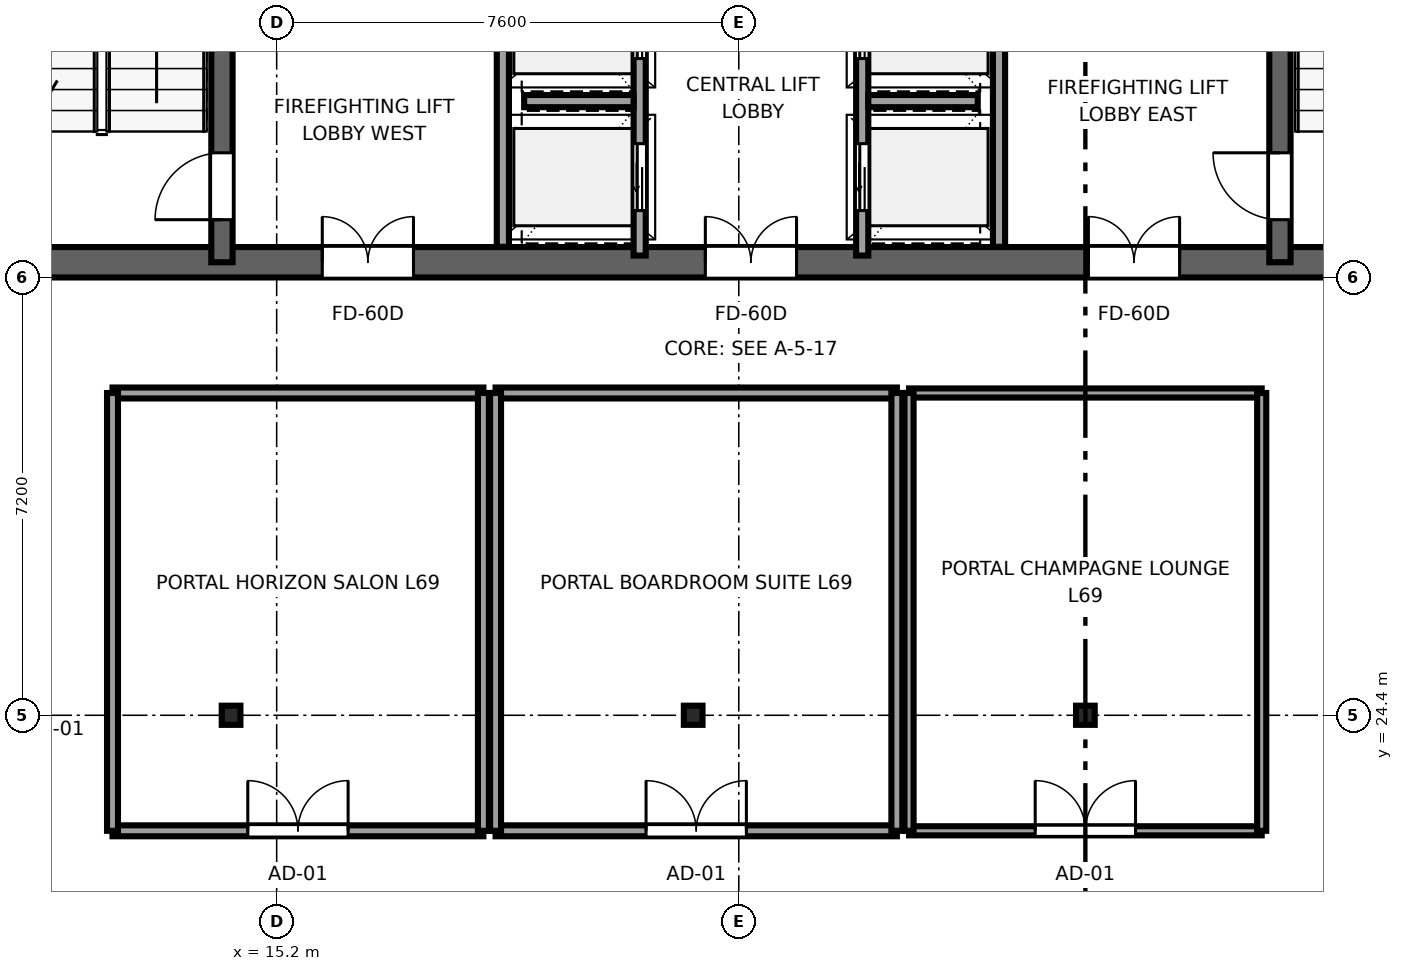
"""IFC4 building model, lengths in metres.
Left out: names, types, materials, properties, quantities, classifications, styles, units other than length and angle.
Written with IfcOpenShell. Run it as: python <this file> out.ifc"""

import sys

from ifc_helpers import new_model, si_unit, direction, frame, frame_2d, origin, origin_2d, place, context, subcontext, project, spatial, rectangle, i_section, extrude, source, transform, mapped, element, fill, save


model = new_model("IFC4")
c1 = context("Model", 3, precision=1e-05, world=origin(), true_north=direction((0.0, 1.0)))
c2 = subcontext(c1, "Body", "Model", "MODEL_VIEW")
j1 = project(units=[si_unit("LENGTHUNIT", "METRE"), si_unit("PLANEANGLEUNIT", "RADIAN")], contexts=[c1])
p1 = place(None, origin())
s1 = spatial("IfcSite", under=j1, at=p1, CompositionType="ELEMENT")
p2 = place(p1, origin())
s2 = spatial("IfcBuilding", under=s1, at=p2, CompositionType="ELEMENT")
p3 = place(p2, frame((0.0, 0.0, 259.4)))
s3 = spatial("IfcBuildingStorey", under=s2, at=p3, CompositionType="ELEMENT", Elevation=259.4)
p4 = place(p3, frame((10.0, 31.85, 0.0), z_axis=(0.0, 0.0, 1.0), x_axis=(1.0, 0.0, 0.0)))
e1 = element("IfcWall", 1, at=p4, inside=s3, PredefinedType="SHEAR", context=c2, shape_type="SweptSolid", body=[
    extrude(rectangle(XDim=26.0, YDim=0.5, at=frame_2d((13.0, 0.0))), origin(), (0.0, 0.0, 1.0), 3.55),
])
p5 = place(p4, frame((7.45, 0.0, 0.0), z_axis=(0.0, 0.0, 1.0), x_axis=(-1.0, 0.0, 0.0)))
e2 = element("IfcOpeningElement", 2, at=p5, cuts=e1, PredefinedType="OPENING", context=c2, shape_type="SweptSolid", body=[
    extrude(rectangle(XDim=1.5, YDim=2.04, at=frame_2d((0.75, 1.02))), frame((0.0, 0.26, 0.0), z_axis=(0.0, -1.0, 0.0), x_axis=(1.0, 0.0, 0.0)), (0.0, 0.0, 1.0), 0.52),
])
p6 = place(p4, frame((13.75, 0.0, 0.0), z_axis=(0.0, 0.0, 1.0), x_axis=(-1.0, 0.0, 0.0)))
e3 = element("IfcOpeningElement", 3, at=p6, cuts=e1, PredefinedType="OPENING", context=c2, shape_type="SweptSolid", body=[
    extrude(rectangle(XDim=1.5, YDim=2.04, at=frame_2d((0.75, 1.02))), frame((0.0, 0.26, 0.0), z_axis=(0.0, -1.0, 0.0), x_axis=(1.0, 0.0, 0.0)), (0.0, 0.0, 1.0), 0.52),
])
p7 = place(p4, frame((20.05, 0.0, 0.0), z_axis=(0.0, 0.0, 1.0), x_axis=(-1.0, 0.0, 0.0)))
e4 = element("IfcOpeningElement", 4, at=p7, cuts=e1, PredefinedType="OPENING", context=c2, shape_type="SweptSolid", body=[
    extrude(rectangle(XDim=1.5, YDim=2.04, at=frame_2d((0.75, 1.02))), frame((0.0, 0.26, 0.0), z_axis=(0.0, -1.0, 0.0), x_axis=(1.0, 0.0, 0.0)), (0.0, 0.0, 1.0), 0.52),
])
p8 = place(p3, frame((14.3, 31.85, 0.0), z_axis=(0.0, 0.0, 1.0), x_axis=(0.0, 1.0, 0.0)))
e5 = element("IfcWall", 5, at=p8, inside=s3, PredefinedType="SHEAR", context=c2, shape_type="SweptSolid", body=[
    extrude(rectangle(XDim=13.1, YDim=0.35, at=frame_2d((6.55, 0.0))), origin(), (0.0, 0.0, 1.0), 3.55),
])
p9 = place(p8, frame((0.7, 0.0, 0.0)))
e6 = element("IfcOpeningElement", 6, at=p9, cuts=e5, PredefinedType="OPENING", context=c2, shape_type="SweptSolid", body=[
    extrude(rectangle(XDim=1.1, YDim=2.12, at=frame_2d((0.55, 1.06))), frame((0.0, 0.185, 0.0), z_axis=(0.0, -1.0, 0.0), x_axis=(1.0, 0.0, 0.0)), (0.0, 0.0, 1.0), 0.37),
])
p10 = place(p3, frame((31.7, 31.85, 0.0), z_axis=(0.0, 0.0, 1.0), x_axis=(0.0, 1.0, 0.0)))
e7 = element("IfcWall", 7, at=p10, inside=s3, PredefinedType="SHEAR", context=c2, shape_type="SweptSolid", body=[
    extrude(rectangle(XDim=13.1, YDim=0.35, at=frame_2d((6.55, 0.0))), origin(), (0.0, 0.0, 1.0), 3.55),
])
p11 = place(p10, frame((1.8, 0.0, 0.0), z_axis=(0.0, 0.0, 1.0), x_axis=(-1.0, 0.0, 0.0)))
e8 = element("IfcOpeningElement", 8, at=p11, cuts=e7, PredefinedType="OPENING", context=c2, shape_type="SweptSolid", body=[
    extrude(rectangle(XDim=1.1, YDim=2.12, at=frame_2d((0.55, 1.06))), frame((0.0, 0.185, 0.0), z_axis=(0.0, -1.0, 0.0), x_axis=(1.0, 0.0, 0.0)), (0.0, 0.0, 1.0), 0.37),
])
m1 = source(origin(), c2, "Body", "SweptSolid", [
    extrude(i_section(OverallWidth=0.307, OverallDepth=0.315, WebThickness=0.012, FlangeThickness=0.019, FilletRadius=0.017, at=origin_2d()), origin(), (0.0, 0.0, 1.0), 3.55),
])
for number, where, z_axis, x_axis in (
    (9, (14.45, 24.4, 0.0), (0.0, 0.0, 1.0), (1.0, 0.0, 0.0)),
    (10, (22.05, 24.4, 0.0), (0.0, 0.0, 1.0), (1.0, 0.0, 0.0)),
    (11, (28.5, 24.4, 0.0), (0.0, 0.0, 1.0), (1.0, 0.0, 0.0)),
):
    element("IfcColumn", number, at=place(p3, frame(where, z_axis=z_axis, x_axis=x_axis)), inside=s3, PredefinedType="COLUMN", context=c2, shape_type="MappedRepresentation", body=[
        mapped(m1, transform((0.0, 0.0, 0.0), x_axis=(1.0, 0.0, 0.0), y_axis=(0.0, 1.0, 0.0), z_axis=(0.0, 0.0, 1.0), scale=1.0)),
    ])
for number, where, z_axis, x_axis in (
    (12, (18.92, 32.104, 0.0), (0.0, 0.0, 1.0), (0.0, 1.0, 0.0)),
    (13, (27.08, 32.104, 0.0), (0.0, 0.0, 1.0), (0.0, 1.0, 0.0)),
):
    element("IfcWall", number, at=place(p3, frame(where, z_axis=z_axis, x_axis=x_axis)), inside=s3, PredefinedType="SOLIDWALL", context=c2, shape_type="SweptSolid", body=[
        extrude(rectangle(XDim=4.046, YDim=0.2, at=frame_2d((2.023, 0.0))), origin(), (0.0, 0.0, 1.0), 3.37),
    ])
p12 = place(p3, frame((21.17, 31.96, 0.0), z_axis=(0.0, 0.0, 1.0), x_axis=(0.0, 1.0, 0.0)))
e14 = element("IfcWall", 14, at=p12, inside=s3, PredefinedType="SOLIDWALL", context=c2, shape_type="SweptSolid", body=[
    extrude(rectangle(XDim=5.08, YDim=0.2, at=frame_2d((2.54, 0.0))), origin(), (0.0, 0.0, 1.0), 3.37),
])
p13 = place(p12, frame((0.74, 0.0, 0.0)))
e15 = element("IfcOpeningElement", 15, at=p13, cuts=e14, PredefinedType="OPENING", context=c2, shape_type="SweptSolid", body=[
    extrude(rectangle(XDim=1.1, YDim=2.12, at=frame_2d((0.55, 1.06))), frame((0.0, 0.11, 0.0), z_axis=(0.0, -1.0, 0.0), x_axis=(1.0, 0.0, 0.0)), (0.0, 0.0, 1.0), 0.22),
])
p14 = place(p12, frame((3.24, 0.0, 0.0)))
e16 = element("IfcOpeningElement", 16, at=p14, cuts=e14, PredefinedType="OPENING", context=c2, shape_type="SweptSolid", body=[
    extrude(rectangle(XDim=1.1, YDim=2.12, at=frame_2d((0.55, 1.06))), frame((0.0, 0.11, 0.0), z_axis=(0.0, -1.0, 0.0), x_axis=(1.0, 0.0, 0.0)), (0.0, 0.0, 1.0), 0.22),
])
p15 = place(p3, frame((19.27, 34.5, 0.0), z_axis=(0.0, 0.0, 1.0), x_axis=(1.0, 0.0, 0.0)))
e17 = element("IfcWall", 17, at=p15, inside=s3, PredefinedType="SOLIDWALL", context=c2, shape_type="SweptSolid", body=[
    extrude(rectangle(XDim=1.8, YDim=0.2, at=frame_2d((0.9, 0.0))), origin(), (0.0, 0.0, 1.0), 3.37),
])
p16 = place(p3, frame((24.83, 31.96, 0.0), z_axis=(0.0, 0.0, 1.0), x_axis=(0.0, 1.0, 0.0)))
e18 = element("IfcWall", 18, at=p16, inside=s3, PredefinedType="SOLIDWALL", context=c2, shape_type="SweptSolid", body=[
    extrude(rectangle(XDim=5.08, YDim=0.2, at=frame_2d((2.54, 0.0))), origin(), (0.0, 0.0, 1.0), 3.37),
])
p17 = place(p16, frame((0.74, 0.0, 0.0)))
e19 = element("IfcOpeningElement", 19, at=p17, cuts=e18, PredefinedType="OPENING", context=c2, shape_type="SweptSolid", body=[
    extrude(rectangle(XDim=1.1, YDim=2.12, at=frame_2d((0.55, 1.06))), frame((0.0, 0.11, 0.0), z_axis=(0.0, -1.0, 0.0), x_axis=(1.0, 0.0, 0.0)), (0.0, 0.0, 1.0), 0.22),
])
p18 = place(p16, frame((3.24, 0.0, 0.0)))
e20 = element("IfcOpeningElement", 20, at=p18, cuts=e18, PredefinedType="OPENING", context=c2, shape_type="SweptSolid", body=[
    extrude(rectangle(XDim=1.1, YDim=2.12, at=frame_2d((0.55, 1.06))), frame((0.0, 0.11, 0.0), z_axis=(0.0, -1.0, 0.0), x_axis=(1.0, 0.0, 0.0)), (0.0, 0.0, 1.0), 0.22),
])
p19 = place(p3, frame((24.93, 34.5, 0.0), z_axis=(0.0, 0.0, 1.0), x_axis=(1.0, 0.0, 0.0)))
e21 = element("IfcWall", 21, at=p19, inside=s3, PredefinedType="SOLIDWALL", context=c2, shape_type="SweptSolid", body=[
    extrude(rectangle(XDim=1.8, YDim=0.2, at=frame_2d((0.9, 0.0))), origin(), (0.0, 0.0, 1.0), 3.37),
])
p20 = place(p3, frame((12.5, 22.5, 0.0), z_axis=(0.0, 0.0, 1.0), x_axis=(1.0, 0.0, 0.0)))
e22 = element("IfcWall", 22, at=p20, inside=s3, PredefinedType="PARTITIONING", context=c2, shape_type="SweptSolid", body=[
    extrude(rectangle(XDim=6.1, YDim=0.18, at=frame_2d((3.05, 0.0))), origin(), (0.0, 0.0, 1.0), 3.37),
])
p21 = place(p20, frame((2.225, 0.0, 0.0)))
e23 = element("IfcOpeningElement", 23, at=p21, cuts=e22, PredefinedType="OPENING", context=c2, shape_type="SweptSolid", body=[
    extrude(rectangle(XDim=1.65, YDim=2.15, at=frame_2d((0.825, 1.075))), frame((0.0, 0.1, 0.0), z_axis=(0.0, -1.0, 0.0), x_axis=(1.0, 0.0, 0.0)), (0.0, 0.0, 1.0), 0.2),
])
p22 = place(p3, frame((12.5, 29.7, 0.0), z_axis=(0.0, 0.0, 1.0), x_axis=(1.0, 0.0, 0.0)))
e24 = element("IfcWall", 24, at=p22, inside=s3, PredefinedType="PARTITIONING", context=c2, shape_type="SweptSolid", body=[
    extrude(rectangle(XDim=6.1, YDim=0.18, at=frame_2d((3.05, 0.0))), origin(), (0.0, 0.0, 1.0), 3.37),
])
for number, where, z_axis, x_axis in (
    (25, (12.5, 22.5, 0.0), (0.0, 0.0, 1.0), (0.0, 1.0, 0.0)),
    (26, (18.6, 22.5, 0.0), (0.0, 0.0, 1.0), (0.0, 1.0, 0.0)),
):
    element("IfcWall", number, at=place(p3, frame(where, z_axis=z_axis, x_axis=x_axis)), inside=s3, PredefinedType="PARTITIONING", context=c2, shape_type="SweptSolid", body=[
        extrude(rectangle(XDim=7.2, YDim=0.18, at=frame_2d((3.6, 0.0))), origin(), (0.0, 0.0, 1.0), 3.37),
    ])
p23 = place(p3, frame((18.8, 22.5, 0.0), z_axis=(0.0, 0.0, 1.0), x_axis=(1.0, 0.0, 0.0)))
e27 = element("IfcWall", 27, at=p23, inside=s3, PredefinedType="PARTITIONING", context=c2, shape_type="SweptSolid", body=[
    extrude(rectangle(XDim=6.6, YDim=0.18, at=frame_2d((3.3, 0.0))), origin(), (0.0, 0.0, 1.0), 3.37),
])
p24 = place(p23, frame((2.475, 0.0, 0.0)))
e28 = element("IfcOpeningElement", 28, at=p24, cuts=e27, PredefinedType="OPENING", context=c2, shape_type="SweptSolid", body=[
    extrude(rectangle(XDim=1.65, YDim=2.15, at=frame_2d((0.825, 1.075))), frame((0.0, 0.1, 0.0), z_axis=(0.0, -1.0, 0.0), x_axis=(1.0, 0.0, 0.0)), (0.0, 0.0, 1.0), 0.2),
])
p25 = place(p3, frame((18.8, 29.7, 0.0), z_axis=(0.0, 0.0, 1.0), x_axis=(1.0, 0.0, 0.0)))
e29 = element("IfcWall", 29, at=p25, inside=s3, PredefinedType="PARTITIONING", context=c2, shape_type="SweptSolid", body=[
    extrude(rectangle(XDim=6.6, YDim=0.18, at=frame_2d((3.3, 0.0))), origin(), (0.0, 0.0, 1.0), 3.37),
])
for number, where, z_axis, x_axis in (
    (30, (18.8, 22.5, 0.0), (0.0, 0.0, 1.0), (0.0, 1.0, 0.0)),
    (31, (25.4, 22.5, 0.0), (0.0, 0.0, 1.0), (0.0, 1.0, 0.0)),
):
    element("IfcWall", number, at=place(p3, frame(where, z_axis=z_axis, x_axis=x_axis)), inside=s3, PredefinedType="PARTITIONING", context=c2, shape_type="SweptSolid", body=[
        extrude(rectangle(XDim=7.2, YDim=0.18, at=frame_2d((3.6, 0.0))), origin(), (0.0, 0.0, 1.0), 3.37),
    ])
p26 = place(p3, frame((25.6, 22.5, 0.0), z_axis=(0.0, 0.0, 1.0), x_axis=(1.0, 0.0, 0.0)))
e32 = element("IfcWall", 32, at=p26, inside=s3, PredefinedType="PARTITIONING", context=c2, shape_type="SweptSolid", body=[
    extrude(rectangle(XDim=5.8, YDim=0.15, at=frame_2d((2.9, 0.0))), origin(), (0.0, 0.0, 1.0), 3.37),
])
p27 = place(p26, frame((2.075, 0.0, 0.0)))
e33 = element("IfcOpeningElement", 33, at=p27, cuts=e32, PredefinedType="OPENING", context=c2, shape_type="SweptSolid", body=[
    extrude(rectangle(XDim=1.65, YDim=2.15, at=frame_2d((0.825, 1.075))), frame((0.0, 0.085, 0.0), z_axis=(0.0, -1.0, 0.0), x_axis=(1.0, 0.0, 0.0)), (0.0, 0.0, 1.0), 0.17),
])
p28 = place(p3, frame((25.6, 29.7, 0.0), z_axis=(0.0, 0.0, 1.0), x_axis=(1.0, 0.0, 0.0)))
e34 = element("IfcWall", 34, at=p28, inside=s3, PredefinedType="PARTITIONING", context=c2, shape_type="SweptSolid", body=[
    extrude(rectangle(XDim=5.8, YDim=0.15, at=frame_2d((2.9, 0.0))), origin(), (0.0, 0.0, 1.0), 3.37),
])
for number, where, z_axis, x_axis in (
    (35, (25.6, 22.5, 0.0), (0.0, 0.0, 1.0), (0.0, 1.0, 0.0)),
    (36, (31.4, 22.5, 0.0), (0.0, 0.0, 1.0), (0.0, 1.0, 0.0)),
):
    element("IfcWall", number, at=place(p3, frame(where, z_axis=z_axis, x_axis=x_axis)), inside=s3, PredefinedType="PARTITIONING", context=c2, shape_type="SweptSolid", body=[
        extrude(rectangle(XDim=7.2, YDim=0.15, at=frame_2d((3.6, 0.0))), origin(), (0.0, 0.0, 1.0), 3.37),
    ])
m2 = source(origin(), c2, "Body", "SweptSolid", [
    extrude(rectangle(XDim=1.1, YDim=2.12, at=frame_2d((0.55, 1.06))), frame((0.0, 0.025, 0.0), z_axis=(0.0, -1.0, 0.0), x_axis=(1.0, 0.0, 0.0)), (0.0, 0.0, 1.0), 0.05),
])
p29 = place(p9, origin())
e37 = element("IfcDoor", 37, at=p29, inside=s3, OperationType="SINGLE_SWING_LEFT", PredefinedType="DOOR", context=c2, shape_type="MappedRepresentation", body=[
    mapped(m2, transform((0.0, 0.0, 0.0), x_axis=(1.0, 0.0, 0.0), y_axis=(0.0, 1.0, 0.0), z_axis=(0.0, 0.0, 1.0), scale=1.0)),
])
fill(e6, e37)
p30 = place(p11, origin())
e38 = element("IfcDoor", 38, at=p30, inside=s3, OperationType="SINGLE_SWING_RIGHT", PredefinedType="DOOR", context=c2, shape_type="MappedRepresentation", body=[
    mapped(m2, transform((0.0, 0.0, 0.0), x_axis=(1.0, 0.0, 0.0), y_axis=(0.0, 1.0, 0.0), z_axis=(0.0, 0.0, 1.0), scale=1.0)),
])
fill(e8, e38)
m3 = source(origin(), c2, "Body", "SweptSolid", [
    extrude(rectangle(XDim=1.5, YDim=2.04, at=frame_2d((0.75, 1.02))), frame((0.0, 0.025, 0.0), z_axis=(0.0, -1.0, 0.0), x_axis=(1.0, 0.0, 0.0)), (0.0, 0.0, 1.0), 0.05),
])
p31 = place(p5, origin())
e39 = element("IfcDoor", 39, at=p31, inside=s3, OperationType="DOUBLE_DOOR_SINGLE_SWING", PredefinedType="DOOR", context=c2, shape_type="MappedRepresentation", body=[
    mapped(m3, transform((0.0, 0.0, 0.0), x_axis=(1.0, 0.0, 0.0), y_axis=(0.0, 1.0, 0.0), z_axis=(0.0, 0.0, 1.0), scale=1.0)),
])
fill(e2, e39)
p32 = place(p6, origin())
e40 = element("IfcDoor", 40, at=p32, inside=s3, OperationType="DOUBLE_DOOR_SINGLE_SWING", PredefinedType="DOOR", context=c2, shape_type="MappedRepresentation", body=[
    mapped(m3, transform((0.0, 0.0, 0.0), x_axis=(1.0, 0.0, 0.0), y_axis=(0.0, 1.0, 0.0), z_axis=(0.0, 0.0, 1.0), scale=1.0)),
])
fill(e3, e40)
p33 = place(p7, origin())
e41 = element("IfcDoor", 41, at=p33, inside=s3, OperationType="DOUBLE_DOOR_SINGLE_SWING", PredefinedType="DOOR", context=c2, shape_type="MappedRepresentation", body=[
    mapped(m3, transform((0.0, 0.0, 0.0), x_axis=(1.0, 0.0, 0.0), y_axis=(0.0, 1.0, 0.0), z_axis=(0.0, 0.0, 1.0), scale=1.0)),
])
fill(e4, e41)
m4 = source(origin(), c2, "Body", "SweptSolid", [
    extrude(rectangle(XDim=1.1, YDim=2.12, at=frame_2d((0.55, 1.06))), frame((0.0, 0.025, 0.0), z_axis=(0.0, -1.0, 0.0), x_axis=(1.0, 0.0, 0.0)), (0.0, 0.0, 1.0), 0.05),
])
p34 = place(p13, origin())
e42 = element("IfcDoor", 42, at=p34, inside=s3, OperationType="SLIDING_TO_LEFT", PredefinedType="DOOR", context=c2, shape_type="MappedRepresentation", body=[
    mapped(m4, transform((0.0, 0.0, 0.0), x_axis=(1.0, 0.0, 0.0), y_axis=(0.0, 1.0, 0.0), z_axis=(0.0, 0.0, 1.0), scale=1.0)),
])
fill(e15, e42)
p35 = place(p14, origin())
e43 = element("IfcDoor", 43, at=p35, inside=s3, OperationType="SLIDING_TO_RIGHT", PredefinedType="DOOR", context=c2, shape_type="MappedRepresentation", body=[
    mapped(m4, transform((0.0, 0.0, 0.0), x_axis=(1.0, 0.0, 0.0), y_axis=(0.0, 1.0, 0.0), z_axis=(0.0, 0.0, 1.0), scale=1.0)),
])
fill(e16, e43)
p36 = place(p17, origin())
e44 = element("IfcDoor", 44, at=p36, inside=s3, OperationType="SLIDING_TO_LEFT", PredefinedType="DOOR", context=c2, shape_type="MappedRepresentation", body=[
    mapped(m4, transform((0.0, 0.0, 0.0), x_axis=(1.0, 0.0, 0.0), y_axis=(0.0, 1.0, 0.0), z_axis=(0.0, 0.0, 1.0), scale=1.0)),
])
fill(e19, e44)
p37 = place(p18, origin())
e45 = element("IfcDoor", 45, at=p37, inside=s3, OperationType="SLIDING_TO_RIGHT", PredefinedType="DOOR", context=c2, shape_type="MappedRepresentation", body=[
    mapped(m4, transform((0.0, 0.0, 0.0), x_axis=(1.0, 0.0, 0.0), y_axis=(0.0, 1.0, 0.0), z_axis=(0.0, 0.0, 1.0), scale=1.0)),
])
fill(e20, e45)
m5 = source(origin(), c2, "Body", "SweptSolid", [
    extrude(rectangle(XDim=1.65, YDim=2.15, at=frame_2d((0.825, 1.075))), frame((0.0, 0.025, 0.0), z_axis=(0.0, -1.0, 0.0), x_axis=(1.0, 0.0, 0.0)), (0.0, 0.0, 1.0), 0.05),
])
p38 = place(p21, origin())
e46 = element("IfcDoor", 46, at=p38, inside=s3, OperationType="DOUBLE_DOOR_SINGLE_SWING", PredefinedType="DOOR", context=c2, shape_type="MappedRepresentation", body=[
    mapped(m5, transform((0.0, 0.0, 0.0), x_axis=(1.0, 0.0, 0.0), y_axis=(0.0, 1.0, 0.0), z_axis=(0.0, 0.0, 1.0), scale=1.0)),
])
fill(e23, e46)
p39 = place(p24, origin())
e47 = element("IfcDoor", 47, at=p39, inside=s3, OperationType="DOUBLE_DOOR_SINGLE_SWING", PredefinedType="DOOR", context=c2, shape_type="MappedRepresentation", body=[
    mapped(m5, transform((0.0, 0.0, 0.0), x_axis=(1.0, 0.0, 0.0), y_axis=(0.0, 1.0, 0.0), z_axis=(0.0, 0.0, 1.0), scale=1.0)),
])
fill(e28, e47)
p40 = place(p27, origin())
e48 = element("IfcDoor", 48, at=p40, inside=s3, OperationType="DOUBLE_DOOR_SINGLE_SWING", PredefinedType="DOOR", context=c2, shape_type="MappedRepresentation", body=[
    mapped(m5, transform((0.0, 0.0, 0.0), x_axis=(1.0, 0.0, 0.0), y_axis=(0.0, 1.0, 0.0), z_axis=(0.0, 0.0, 1.0), scale=1.0)),
])
fill(e33, e48)
save(model, sys.argv[1])
